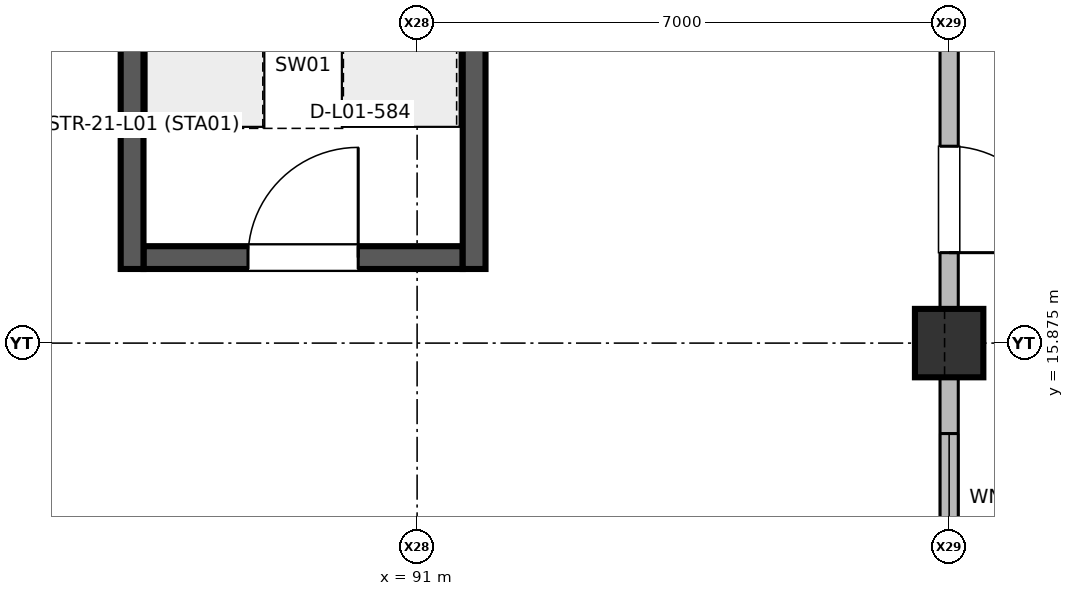
"""IFC4 building model, lengths in metres.
Left out: names, types, materials, properties, quantities, classifications, styles, units other than length and angle.
Written with IfcOpenShell. Run it as: python <this file> out.ifc"""

import sys

from ifc_helpers import new_model, si_unit, direction, frame, frame_2d, origin, origin_2d, place, context, subcontext, project, spatial, rectangle, circle, extrude, element, fill, save


model = new_model("IFC4")
c1 = context("Model", 3, precision=1e-05, world=origin(), true_north=direction((0.0, 1.0)))
c2 = subcontext(c1, "Body", "Model", "MODEL_VIEW")
j1 = project(units=[si_unit("LENGTHUNIT", "METRE"), si_unit("PLANEANGLEUNIT", "RADIAN")], contexts=[c1])
p1 = place(None, origin())
s1 = spatial("IfcSite", under=j1, at=p1, CompositionType="ELEMENT")
p2 = place(p1, origin())
s2 = spatial("IfcBuilding", under=s1, at=p2, CompositionType="ELEMENT")
p3 = place(p2, origin())
s3 = spatial("IfcBuildingStorey", under=s2, at=p3, CompositionType="ELEMENT", Elevation=0.0)
p4 = place(p3, frame((98.0, 15.875, 0.0), z_axis=(0.0, 0.0, 1.0), x_axis=(1.0, 0.0, 0.0)))
e1 = element("IfcColumn", 1, at=p4, inside=s3, PredefinedType="COLUMN", context=c2, shape_type="SweptSolid", body=[
    extrude(circle(Radius=0.45, at=origin_2d()), origin(), (0.0, 0.0, 1.0), 5.998),
])
p5 = place(p3, frame((98.0, 15.435, 0.0), z_axis=(0.0, 0.0, 1.0), x_axis=(0.0, -1.0, 0.0)))
e2 = element("IfcWall", 2, at=p5, inside=s3, PredefinedType="SOLIDWALL", context=c2, shape_type="SweptSolid", body=[
    extrude(rectangle(XDim=12.87, YDim=0.24, at=frame_2d((6.435, 0.0))), origin(), (0.0, 0.0, 1.0), 4.625),
])
p6 = place(p5, frame((4.635, 0.0, 0.0)))
e3 = element("IfcOpeningElement", 3, at=p6, cuts=e2, PredefinedType="OPENING", context=c2, shape_type="SweptSolid", body=[
    extrude(rectangle(XDim=3.6, YDim=2.75, at=frame_2d((1.8, 1.375))), frame((0.0, 0.13, 0.0), z_axis=(0.0, -1.0, 0.0), x_axis=(1.0, 0.0, 0.0)), (0.0, 0.0, 1.0), 0.26),
])
p7 = place(p5, frame((0.75, 0.0, 1.0)))
e4 = element("IfcOpeningElement", 4, at=p7, cuts=e2, PredefinedType="OPENING", context=c2, shape_type="SweptSolid", body=[
    extrude(rectangle(XDim=1.7, YDim=1.85, at=frame_2d((0.85, 0.925))), frame((0.0, 0.13, 0.0), z_axis=(0.0, -1.0, 0.0), x_axis=(1.0, 0.0, 0.0)), (0.0, 0.0, 1.0), 0.26),
])
p8 = place(p5, frame((10.42, 0.0, 1.0)))
e5 = element("IfcOpeningElement", 5, at=p8, cuts=e2, PredefinedType="OPENING", context=c2, shape_type="SweptSolid", body=[
    extrude(rectangle(XDim=1.7, YDim=1.85, at=frame_2d((0.85, 0.925))), frame((0.0, 0.13, 0.0), z_axis=(0.0, -1.0, 0.0), x_axis=(1.0, 0.0, 0.0)), (0.0, 0.0, 1.0), 0.26),
])
p9 = place(p3, frame((98.0, 29.185, 0.0), z_axis=(0.0, 0.0, 1.0), x_axis=(0.0, -1.0, 0.0)))
e6 = element("IfcWall", 6, at=p9, inside=s3, PredefinedType="SOLIDWALL", context=c2, shape_type="SweptSolid", body=[
    extrude(rectangle(XDim=12.87, YDim=0.24, at=frame_2d((6.435, 0.0))), origin(), (0.0, 0.0, 1.0), 3.925),
])
p10 = place(p9, frame((4.935, 0.0, 0.0)))
e7 = element("IfcOpeningElement", 7, at=p10, cuts=e6, PredefinedType="OPENING", context=c2, shape_type="SweptSolid", body=[
    extrude(rectangle(XDim=3.0, YDim=2.65, at=frame_2d((1.5, 1.325))), frame((0.0, 0.13, 0.0), z_axis=(0.0, -1.0, 0.0), x_axis=(1.0, 0.0, 0.0)), (0.0, 0.0, 1.0), 0.26),
])
p11 = place(p9, frame((0.75, 0.0, 0.0)))
e8 = element("IfcOpeningElement", 8, at=p11, cuts=e6, PredefinedType="OPENING", context=c2, shape_type="SweptSolid", body=[
    extrude(rectangle(XDim=1.4, YDim=2.2, at=frame_2d((0.7, 1.1))), frame((0.0, 0.13, 0.0), z_axis=(0.0, -1.0, 0.0), x_axis=(1.0, 0.0, 0.0)), (0.0, 0.0, 1.0), 0.26),
])
p12 = place(p9, frame((10.72, 0.0, 0.0)))
e9 = element("IfcOpeningElement", 9, at=p12, cuts=e6, PredefinedType="OPENING", context=c2, shape_type="SweptSolid", body=[
    extrude(rectangle(XDim=1.4, YDim=2.2, at=frame_2d((0.7, 1.1))), frame((0.0, 0.13, 0.0), z_axis=(0.0, -1.0, 0.0), x_axis=(1.0, 0.0, 0.0)), (0.0, 0.0, 1.0), 0.26),
])
p13 = place(p3, frame((87.4, 17.0, 0.0), z_axis=(0.0, 0.0, 1.0), x_axis=(1.0, 0.0, 0.0)))
e10 = element("IfcWall", 10, at=p13, inside=s3, PredefinedType="SHEAR", context=c2, shape_type="SweptSolid", body=[
    extrude(rectangle(XDim=4.2, YDim=0.3, at=frame_2d((2.1, 0.0))), origin(), (0.0, 0.0, 1.0), 5.75),
])
p14 = place(p13, frame((1.375, 0.0, 0.0)))
e11 = element("IfcOpeningElement", 11, at=p14, cuts=e10, PredefinedType="OPENING", context=c2, shape_type="SweptSolid", body=[
    extrude(rectangle(XDim=1.45, YDim=2.2, at=frame_2d((0.725, 1.1))), frame((0.0, 0.16, 0.0), z_axis=(0.0, -1.0, 0.0), x_axis=(1.0, 0.0, 0.0)), (0.0, 0.0, 1.0), 0.32),
])
for number, where, z_axis, x_axis in (
    (12, (87.25, 16.85, 0.0), (0.0, 0.0, 1.0), (0.0, 1.0, 0.0)),
    (13, (91.75, 16.85, 0.0), (0.0, 0.0, 1.0), (0.0, 1.0, 0.0)),
):
    element("IfcWall", number, at=place(p3, frame(where, z_axis=z_axis, x_axis=x_axis)), inside=s3, PredefinedType="SHEAR", context=c2, shape_type="SweptSolid", body=[
        extrude(rectangle(XDim=8.45, YDim=0.3, at=frame_2d((4.225, 0.0))), origin(), (0.0, 0.0, 1.0), 5.75),
    ])
p15 = place(p7, origin())
e14 = element("IfcWindow", 14, at=p15, inside=s3, PartitioningType="SINGLE_PANEL", PredefinedType="WINDOW", context=c2, shape_type="SweptSolid", body=[
    extrude(rectangle(XDim=1.7, YDim=1.85, at=frame_2d((0.85, 0.925))), frame((0.0, 0.03, 0.0), z_axis=(0.0, -1.0, 0.0), x_axis=(1.0, 0.0, 0.0)), (0.0, 0.0, 1.0), 0.06),
])
fill(e4, e14)
p16 = place(p12, origin())
e15 = element("IfcDoor", 15, at=p16, inside=s3, OperationType="SINGLE_SWING_RIGHT", PredefinedType="DOOR", context=c2, shape_type="SweptSolid", body=[
    extrude(rectangle(XDim=1.4, YDim=2.2, at=frame_2d((0.7, 1.1))), frame((0.0, 0.025, 0.0), z_axis=(0.0, -1.0, 0.0), x_axis=(1.0, 0.0, 0.0)), (0.0, 0.0, 1.0), 0.05),
])
fill(e9, e15)
p17 = place(p14, origin())
e16 = element("IfcDoor", 16, at=p17, inside=s3, OperationType="SINGLE_SWING_RIGHT", PredefinedType="DOOR", context=c2, shape_type="SweptSolid", body=[
    extrude(rectangle(XDim=1.45, YDim=2.2, at=frame_2d((0.725, 1.1))), frame((0.0, 0.025, 0.0), z_axis=(0.0, -1.0, 0.0), x_axis=(1.0, 0.0, 0.0)), (0.0, 0.0, 1.0), 0.05),
])
fill(e11, e16)
save(model, sys.argv[1])
